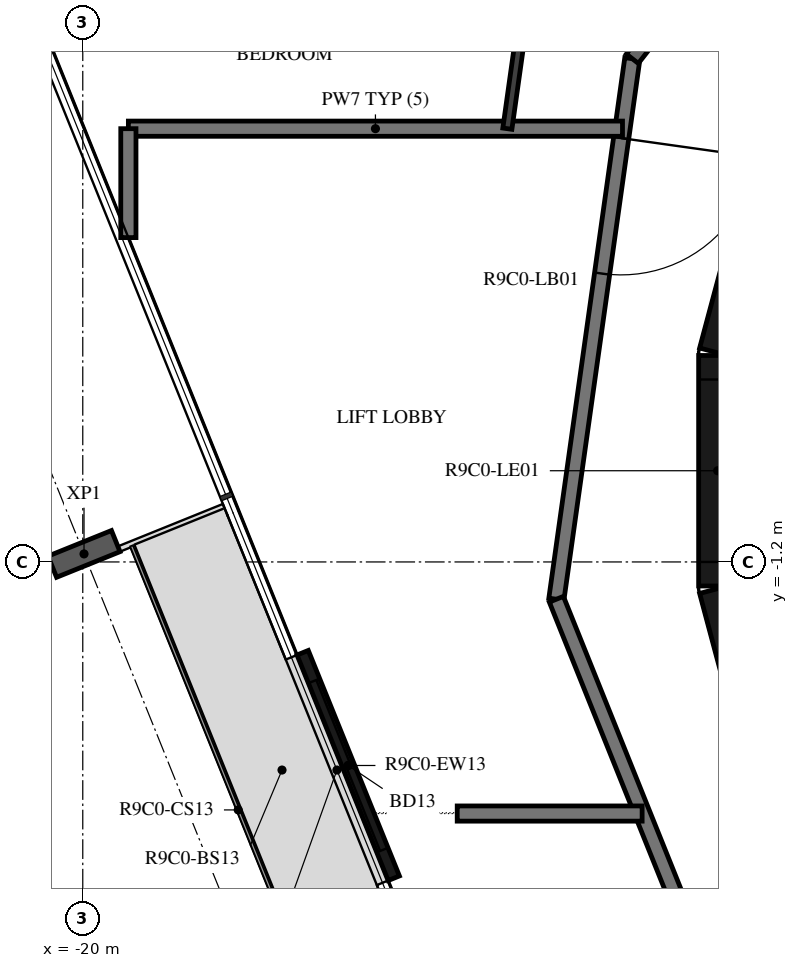
"""IFC4 building model, lengths in metres.
Left out: names, types, materials, properties, quantities, classifications, styles, units other than length and angle.
Written with IfcOpenShell. Run it as: python <this file> out.ifc"""

import sys

from ifc_helpers import new_model, si_unit, direction, frame, frame_2d, origin, origin_2d, place, context, subcontext, project, spatial, rectangle, i_section, extrude, element, fill, save


model = new_model("IFC4")
c1 = context("Model", 3, precision=1e-05, world=origin(), true_north=direction((0.0, 1.0)))
c2 = subcontext(c1, "Body", "Model", "MODEL_VIEW")
j1 = project(units=[si_unit("LENGTHUNIT", "METRE"), si_unit("PLANEANGLEUNIT", "RADIAN")], contexts=[c1])
p1 = place(None, origin())
s1 = spatial("IfcSite", under=j1, at=p1, CompositionType="ELEMENT")
p2 = place(p1, origin())
s2 = spatial("IfcBuilding", under=s1, at=p2, CompositionType="ELEMENT")
p3 = place(p2, frame((0.0, 0.0, 354.0)))
s3 = spatial("IfcBuildingStorey", under=s2, at=p3, CompositionType="ELEMENT", Elevation=354.0)
p4 = place(p3, frame((-19.984, -1.094, -0.38), z_axis=(0.0, 0.0, 1.0), x_axis=(-0.374606892434, 0.927183733755, 0.0)))
e1 = element("IfcColumn", 1, at=p4, inside=s3, PredefinedType="COLUMN", context=c2, shape_type="SweptSolid", body=[
    extrude(i_section(OverallWidth=0.3, OverallDepth=0.9, WebThickness=0.019, FlangeThickness=0.035, FilletRadius=0.03, at=origin_2d()), origin(), (0.0, 0.0, 1.0), 3.5),
])
p5 = place(p3, frame((-17.107, -2.394, 0.0), z_axis=(0.0, 0.0, 1.0), x_axis=(0.374598019739, -0.927187318511, 0.0)))
e2 = element("IfcWall", 2, at=p5, inside=s3, PredefinedType="STANDARD", context=c2, shape_type="SweptSolid", body=[
    extrude(rectangle(XDim=3.2, YDim=0.16, at=frame_2d((1.6, 0.0))), origin(), (0.0, 0.0, 1.0), 3.12),
])
p6 = place(p5, frame((0.4, 0.0, 0.0)))
e3 = element("IfcOpeningElement", 3, at=p6, cuts=e2, PredefinedType="OPENING", context=c2, shape_type="SweptSolid", body=[
    extrude(rectangle(XDim=2.4, YDim=2.4, at=frame_2d((1.2, 1.2))), frame((0.0, 0.09, 0.0), z_axis=(0.0, -1.0, 0.0), x_axis=(1.0, 0.0, 0.0)), (0.0, 0.0, 1.0), 0.18),
])
p7 = place(p3, frame((-10.858, 4.479, 0.0), z_axis=(0.0, 0.0, 1.0), x_axis=(-0.258734743916, -0.965948410781, 0.0)))
e4 = element("IfcWall", 4, at=p7, inside=s3, PredefinedType="SHEAR", context=c2, shape_type="SweptSolid", body=[
    extrude(rectangle(XDim=3.033, YDim=0.5, at=frame_2d((1.516, 0.0))), origin(), (0.0, 0.0, 1.0), 3.12),
])
p8 = place(p3, frame((-11.647, 1.516, 0.0), z_axis=(0.0, 0.0, 1.0), x_axis=(0.0, -1.0, 0.0)))
e5 = element("IfcWall", 5, at=p8, inside=s3, PredefinedType="SHEAR", context=c2, shape_type="SweptSolid", body=[
    extrude(rectangle(XDim=3.033, YDim=0.5, at=frame_2d((1.516, 0.0))), origin(), (0.0, 0.0, 1.0), 3.12),
])
p9 = place(p8, frame((0.316, 0.0, 0.0)))
e6 = element("IfcOpeningElement", 6, at=p9, cuts=e5, PredefinedType="OPENING", context=c2, shape_type="SweptSolid", body=[
    extrude(rectangle(XDim=2.4, YDim=2.1, at=frame_2d((1.2, 1.05))), frame((0.0, 0.26, 0.0), z_axis=(0.0, -1.0, 0.0), x_axis=(1.0, 0.0, 0.0)), (0.0, 0.0, 1.0), 0.52),
])
p10 = place(p3, frame((-11.643, -1.55, 0.0), z_axis=(0.0, 0.0, 1.0), x_axis=(0.258734743916, -0.965948410781, 0.0)))
e7 = element("IfcWall", 7, at=p10, inside=s3, PredefinedType="SHEAR", context=c2, shape_type="SweptSolid", body=[
    extrude(rectangle(XDim=3.033, YDim=0.5, at=frame_2d((1.516, 0.0))), origin(), (0.0, 0.0, 1.0), 3.12),
])
p11 = place(p10, frame((1.066, 0.0, 0.0)))
e8 = element("IfcOpeningElement", 8, at=p11, cuts=e7, PredefinedType="OPENING", context=c2, shape_type="SweptSolid", body=[
    extrude(rectangle(XDim=0.9, YDim=2.1, at=frame_2d((0.45, 1.05))), frame((0.0, 0.26, 0.0), z_axis=(0.0, -1.0, 0.0), x_axis=(1.0, 0.0, 0.0)), (0.0, 0.0, 1.0), 0.52),
])
p12 = place(p3, frame((-12.77, 5.42, 0.0), z_axis=(0.0, 0.0, 1.0), x_axis=(-0.139155334385, -0.990270565508, 0.0)))
e9 = element("IfcWall", 9, at=p12, inside=s3, PredefinedType="STANDARD", context=c2, shape_type="SweptSolid", body=[
    extrude(rectangle(XDim=7.181, YDim=0.2, at=frame_2d((3.59, 0.0))), origin(), (0.0, 0.0, 1.0), 3.12),
])
p13 = place(p12, frame((1.055, 0.0, 0.0)))
e10 = element("IfcOpeningElement", 10, at=p13, cuts=e9, PredefinedType="OPENING", context=c2, shape_type="SweptSolid", body=[
    extrude(rectangle(XDim=1.8, YDim=2.1, at=frame_2d((0.9, 1.05))), frame((0.0, 0.11, 0.0), z_axis=(0.0, -1.0, 0.0), x_axis=(1.0, 0.0, 0.0)), (0.0, 0.0, 1.0), 0.22),
])
p14 = place(p3, frame((-13.769, -1.691, 0.0), z_axis=(0.0, 0.0, 1.0), x_axis=(0.372720094028, -0.927943819155, 0.0)))
e11 = element("IfcWall", 11, at=p14, inside=s3, PredefinedType="STANDARD", context=c2, shape_type="SweptSolid", body=[
    extrude(rectangle(XDim=4.875, YDim=0.2, at=frame_2d((2.438, 0.0))), origin(), (0.0, 0.0, 1.0), 3.12),
])
p15 = place(p3, frame((-8.349, 11.079, 0.0), z_axis=(0.0, 0.0, 1.0), x_axis=(-0.615669112324, -0.78800478687, 0.0)))
e12 = element("IfcWall", 12, at=p15, inside=s3, PredefinedType="STANDARD", context=c2, shape_type="SweptSolid", body=[
    extrude(rectangle(XDim=7.181, YDim=0.2, at=frame_2d((3.591, 0.0))), origin(), (0.0, 0.0, 1.0), 3.12),
])
p16 = place(p15, frame((2.1, 0.0, 0.0)))
e13 = element("IfcOpeningElement", 13, at=p16, cuts=e12, PredefinedType="OPENING", context=c2, shape_type="SweptSolid", body=[
    extrude(rectangle(XDim=1.0, YDim=2.1, at=frame_2d((0.5, 1.05))), frame((0.0, 0.11, 0.0), z_axis=(0.0, -1.0, 0.0), x_axis=(1.0, 0.0, 0.0)), (0.0, 0.0, 1.0), 0.22),
])
p17 = place(p15, frame((3.79, 0.0, 0.0)))
e14 = element("IfcOpeningElement", 14, at=p17, cuts=e12, PredefinedType="OPENING", context=c2, shape_type="SweptSolid", body=[
    extrude(rectangle(XDim=1.0, YDim=2.1, at=frame_2d((0.5, 1.05))), frame((0.0, 0.11, 0.0), z_axis=(0.0, -1.0, 0.0), x_axis=(1.0, 0.0, 0.0)), (0.0, 0.0, 1.0), 0.22),
])
p18 = place(p3, frame((-12.899, 4.5, 0.0), z_axis=(0.0, 0.0, 1.0), x_axis=(-1.0, 0.0, 0.0)))
e15 = element("IfcWall", 15, at=p18, inside=s3, PredefinedType="STANDARD", context=c2, shape_type="SweptSolid", body=[
    extrude(rectangle(XDim=6.5, YDim=0.2, at=frame_2d((3.25, 0.0))), origin(), (0.0, 0.0, 1.0), 3.12),
])
p19 = place(p3, frame((-19.4, 4.5, 0.0), z_axis=(0.0, 0.0, 1.0), x_axis=(0.0, -1.0, 0.0)))
e16 = element("IfcWall", 16, at=p19, inside=s3, PredefinedType="STANDARD", context=c2, shape_type="SweptSolid", body=[
    extrude(rectangle(XDim=1.433, YDim=0.2, at=frame_2d((0.716, 0.0))), origin(), (0.0, 0.0, 1.0), 3.12),
])
p20 = place(p3, frame((-15.074, -4.51, 0.0), z_axis=(0.0, 0.0, 1.0), x_axis=(1.0, 0.0, 0.0)))
e17 = element("IfcWall", 17, at=p20, inside=s3, PredefinedType="STANDARD", context=c2, shape_type="SweptSolid", body=[
    extrude(rectangle(XDim=2.433, YDim=0.2, at=frame_2d((1.216, 0.0))), origin(), (0.0, 0.0, 1.0), 3.12),
])
p21 = place(p3, frame((-14.248, 5.683, 0.0), z_axis=(0.0, 0.0, 1.0), x_axis=(-0.139189066398, -0.990265824814, 0.0)))
e18 = element("IfcWall", 18, at=p21, inside=s3, PredefinedType="PARTITIONING", context=c2, shape_type="SweptSolid", body=[
    extrude(rectangle(XDim=1.195, YDim=0.12, at=frame_2d((0.597, 0.0))), origin(), (0.0, 0.0, 1.0), 3.12),
])
p22 = place(p6, origin())
e19 = element("IfcDoor", 19, at=p22, inside=s3, OperationType="DOUBLE_DOOR_SLIDING", PredefinedType="DOOR", context=c2, shape_type="SweptSolid", body=[
    extrude(rectangle(XDim=2.4, YDim=2.4, at=frame_2d((1.2, 1.2))), frame((0.0, 0.025, 0.0), z_axis=(0.0, -1.0, 0.0), x_axis=(1.0, 0.0, 0.0)), (0.0, 0.0, 1.0), 0.05),
])
fill(e3, e19)
p23 = place(p9, origin())
e20 = element("IfcDoor", 20, at=p23, inside=s3, OperationType="DOUBLE_DOOR_SINGLE_SWING", PredefinedType="DOOR", context=c2, shape_type="SweptSolid", body=[
    extrude(rectangle(XDim=2.4, YDim=2.1, at=frame_2d((1.2, 1.05))), frame((0.0, 0.025, 0.0), z_axis=(0.0, -1.0, 0.0), x_axis=(1.0, 0.0, 0.0)), (0.0, 0.0, 1.0), 0.05),
])
fill(e6, e20)
p24 = place(p13, origin())
e21 = element("IfcDoor", 21, at=p24, inside=s3, OperationType="DOUBLE_DOOR_SINGLE_SWING", PredefinedType="DOOR", context=c2, shape_type="SweptSolid", body=[
    extrude(rectangle(XDim=1.8, YDim=2.1, at=frame_2d((0.9, 1.05))), frame((0.0, 0.025, 0.0), z_axis=(0.0, -1.0, 0.0), x_axis=(1.0, 0.0, 0.0)), (0.0, 0.0, 1.0), 0.05),
])
fill(e10, e21)
save(model, sys.argv[1])
